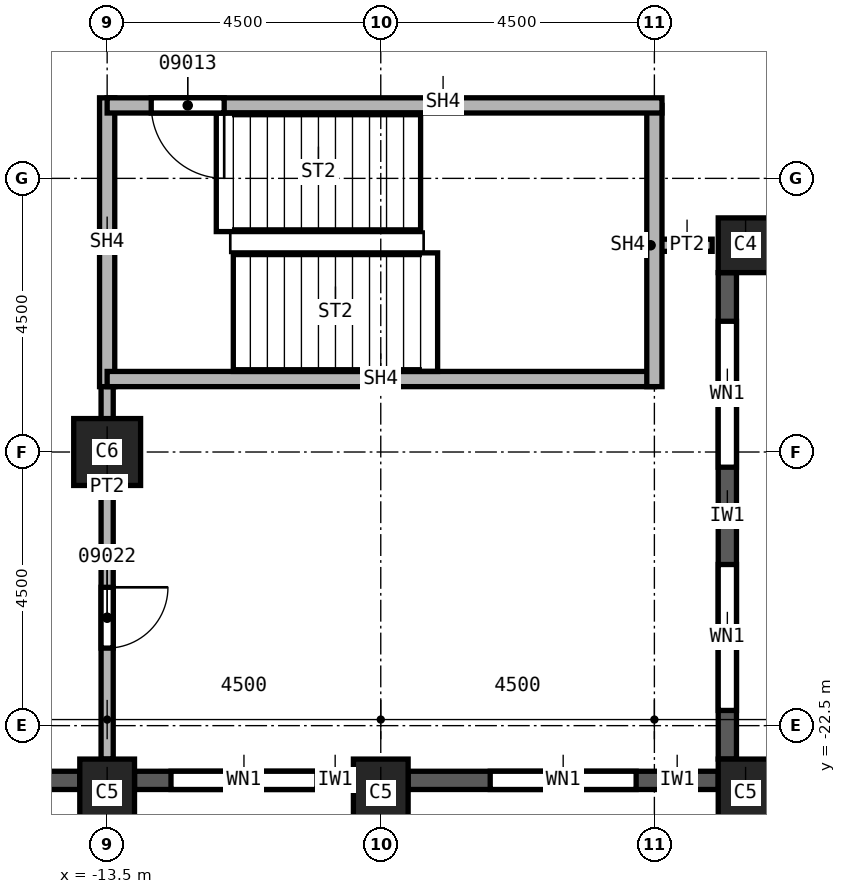
"""IFC4 building model, lengths in metres.
Left out: names, types, materials, properties, quantities, classifications, styles, units other than length and angle.
Written with IfcOpenShell. Run it as: python <this file> out.ifc"""

import sys

from ifc_helpers import new_model, si_unit, direction, frame, frame_2d, origin, origin_2d, place, context, subcontext, project, spatial, rectangle, extrude, element, fill, save


model = new_model("IFC4")
c1 = context("Model", 3, precision=1e-05, world=origin(), true_north=direction((0.0, 1.0)))
c2 = subcontext(c1, "Body", "Model", "MODEL_VIEW")
j1 = project(units=[si_unit("LENGTHUNIT", "METRE"), si_unit("PLANEANGLEUNIT", "RADIAN")], contexts=[c1])
p1 = place(None, origin())
s1 = spatial("IfcSite", under=j1, at=p1, CompositionType="ELEMENT")
p2 = place(p1, origin())
s2 = spatial("IfcBuilding", under=s1, at=p2, CompositionType="ELEMENT")
p3 = place(p2, frame((0.0, 0.0, 162.0)))
s3 = spatial("IfcBuildingStorey", under=s2, at=p3, CompositionType="ELEMENT", Elevation=162.0)
p4 = place(p3, frame((-13.5, -18.0, 0.0), z_axis=(0.0, 0.0, 1.0), x_axis=(1.0, 0.0, 0.0)))
e1 = element("IfcColumn", 1, at=p4, inside=s3, PredefinedType="COLUMN", context=c2, shape_type="SweptSolid", body=[
    extrude(rectangle(XDim=1.1, YDim=1.1, at=origin_2d()), origin(), (0.0, 0.0, 1.0), 3.7),
])
for number, where, z_axis, x_axis in (
    (2, (-3.0, -23.6, 0.0), (0.0, 0.0, 1.0), (1.0, 0.0, 0.0)),
    (3, (-9.0, -23.6, 0.0), (0.0, 0.0, 1.0), (1.0, 0.0, 0.0)),
    (4, (-13.5, -23.6, 0.0), (0.0, 0.0, 1.0), (1.0, 0.0, 0.0)),
):
    element("IfcColumn", number, at=place(p3, frame(where, z_axis=z_axis, x_axis=x_axis)), inside=s3, PredefinedType="COLUMN", context=c2, shape_type="SweptSolid", body=[
        extrude(rectangle(XDim=0.9, YDim=1.1, at=origin_2d()), origin(), (0.0, 0.0, 1.0), 3.7),
    ])
p5 = place(p3, frame((-3.0, -14.6, 0.0), z_axis=(0.0, 0.0, 1.0), x_axis=(1.0, 0.0, 0.0)))
e5 = element("IfcColumn", 5, at=p5, inside=s3, PredefinedType="COLUMN", context=c2, shape_type="SweptSolid", body=[
    extrude(rectangle(XDim=0.9, YDim=0.9, at=origin_2d()), origin(), (0.0, 0.0, 1.0), 3.7),
])
p6 = place(p3, frame((-17.55, -23.4, 0.0), z_axis=(0.0, 0.0, 1.0), x_axis=(1.0, 0.0, 0.0)))
e6 = element("IfcWall", 6, at=p6, inside=s3, PredefinedType="SOLIDWALL", context=c2, shape_type="SweptSolid", body=[
    extrude(rectangle(XDim=3.6, YDim=0.3, at=frame_2d((1.8, 0.0))), origin(), (0.0, 0.0, 1.0), 3.1),
])
p7 = place(p6, frame((0.775, 0.0, 0.8)))
e7 = element("IfcOpeningElement", 7, at=p7, cuts=e6, PredefinedType="OPENING", context=c2, shape_type="SweptSolid", body=[
    extrude(rectangle(XDim=1.0, YDim=1.95, at=frame_2d((0.5, 0.975))), frame((0.0, 0.15, 0.0), z_axis=(0.0, -1.0, 0.0), x_axis=(1.0, 0.0, 0.0)), (0.0, 0.0, 1.0), 0.3),
])
p8 = place(p6, frame((2.375, 0.0, 0.8)))
e8 = element("IfcOpeningElement", 8, at=p8, cuts=e6, PredefinedType="OPENING", context=c2, shape_type="SweptSolid", body=[
    extrude(rectangle(XDim=0.6, YDim=1.95, at=frame_2d((0.3, 0.975))), frame((0.0, 0.15, 0.0), z_axis=(0.0, -1.0, 0.0), x_axis=(1.0, 0.0, 0.0)), (0.0, 0.0, 1.0), 0.3),
])
p9 = place(p3, frame((-13.05, -23.4, 0.0), z_axis=(0.0, 0.0, 1.0), x_axis=(1.0, 0.0, 0.0)))
e9 = element("IfcWall", 9, at=p9, inside=s3, PredefinedType="SOLIDWALL", context=c2, shape_type="SweptSolid", body=[
    extrude(rectangle(XDim=3.6, YDim=0.3, at=frame_2d((1.8, 0.0))), origin(), (0.0, 0.0, 1.0), 3.1),
])
p10 = place(p9, frame((0.6, 0.0, 0.8)))
e10 = element("IfcOpeningElement", 10, at=p10, cuts=e9, PredefinedType="OPENING", context=c2, shape_type="SweptSolid", body=[
    extrude(rectangle(XDim=2.4, YDim=1.95, at=frame_2d((1.2, 0.975))), frame((0.0, 0.15, 0.0), z_axis=(0.0, -1.0, 0.0), x_axis=(1.0, 0.0, 0.0)), (0.0, 0.0, 1.0), 0.3),
])
p11 = place(p3, frame((-8.55, -23.4, 0.0), z_axis=(0.0, 0.0, 1.0), x_axis=(1.0, 0.0, 0.0)))
e11 = element("IfcWall", 11, at=p11, inside=s3, PredefinedType="SOLIDWALL", context=c2, shape_type="SweptSolid", body=[
    extrude(rectangle(XDim=5.1, YDim=0.3, at=frame_2d((2.55, 0.0))), origin(), (0.0, 0.0, 1.0), 3.1),
])
p12 = place(p11, frame((1.35, 0.0, 0.8)))
e12 = element("IfcOpeningElement", 12, at=p12, cuts=e11, PredefinedType="OPENING", context=c2, shape_type="SweptSolid", body=[
    extrude(rectangle(XDim=2.4, YDim=1.95, at=frame_2d((1.2, 0.975))), frame((0.0, 0.15, 0.0), z_axis=(0.0, -1.0, 0.0), x_axis=(1.0, 0.0, 0.0)), (0.0, 0.0, 1.0), 0.3),
])
p13 = place(p3, frame((-3.3, -23.05, 0.0), z_axis=(0.0, 0.0, 1.0), x_axis=(0.0, 1.0, 0.0)))
e13 = element("IfcWall", 13, at=p13, inside=s3, PredefinedType="SOLIDWALL", context=c2, shape_type="SweptSolid", body=[
    extrude(rectangle(XDim=8.0, YDim=0.3, at=frame_2d((4.0, 0.0))), origin(), (0.0, 0.0, 1.0), 3.1),
])
p14 = place(p13, frame((0.8, 0.0, 0.8)))
e14 = element("IfcOpeningElement", 14, at=p14, cuts=e13, PredefinedType="OPENING", context=c2, shape_type="SweptSolid", body=[
    extrude(rectangle(XDim=2.4, YDim=1.95, at=frame_2d((1.2, 0.975))), frame((0.0, 0.15, 0.0), z_axis=(0.0, -1.0, 0.0), x_axis=(1.0, 0.0, 0.0)), (0.0, 0.0, 1.0), 0.3),
])
p15 = place(p13, frame((4.8, 0.0, 0.8)))
e15 = element("IfcOpeningElement", 15, at=p15, cuts=e13, PredefinedType="OPENING", context=c2, shape_type="SweptSolid", body=[
    extrude(rectangle(XDim=2.4, YDim=1.95, at=frame_2d((1.2, 0.975))), frame((0.0, 0.15, 0.0), z_axis=(0.0, -1.0, 0.0), x_axis=(1.0, 0.0, 0.0)), (0.0, 0.0, 1.0), 0.3),
])
p16 = place(p3, frame((-13.5, -16.675, 0.0), z_axis=(0.0, 0.0, 1.0), x_axis=(0.0, -1.0, 0.0)))
e16 = element("IfcWall", 16, at=p16, inside=s3, PredefinedType="PARTITIONING", context=c2, shape_type="SweptSolid", body=[
    extrude(rectangle(XDim=6.375, YDim=0.2, at=frame_2d((3.188, 0.0))), origin(), (0.0, 0.0, 1.0), 3.7),
])
p17 = place(p16, frame((3.55, 0.0, 0.0)))
e17 = element("IfcOpeningElement", 17, at=p17, cuts=e16, PredefinedType="OPENING", context=c2, shape_type="SweptSolid", body=[
    extrude(rectangle(XDim=1.0, YDim=2.1, at=frame_2d((0.5, 1.05))), frame((0.0, 0.1, 0.0), z_axis=(0.0, -1.0, 0.0), x_axis=(1.0, 0.0, 0.0)), (0.0, 0.0, 1.0), 0.2),
])
p18 = place(p3, frame((-3.55, -14.6, 0.0), z_axis=(0.0, 0.0, 1.0), x_axis=(-1.0, 0.0, 0.0)))
e18 = element("IfcWall", 18, at=p18, inside=s3, PredefinedType="PARTITIONING", context=c2, shape_type="SweptSolid", body=[
    extrude(rectangle(XDim=0.95, YDim=0.2, at=frame_2d((0.475, 0.0))), origin(), (0.0, 0.0, 1.0), 3.7),
])
p19 = place(p3, frame((-13.5, -12.175, 0.0), z_axis=(0.0, 0.0, 1.0), x_axis=(0.0, -1.0, 0.0)))
e19 = element("IfcWall", 19, at=p19, inside=s3, PredefinedType="SOLIDWALL", context=c2, shape_type="SweptSolid", body=[
    extrude(rectangle(XDim=4.75, YDim=0.25, at=frame_2d((2.375, 0.0))), origin(), (0.0, 0.0, 1.0), 3.7),
])
p20 = place(p3, frame((-4.5, -16.8, 0.0), z_axis=(0.0, 0.0, 1.0), x_axis=(-1.0, 0.0, 0.0)))
e20 = element("IfcWall", 20, at=p20, inside=s3, PredefinedType="SOLIDWALL", context=c2, shape_type="SweptSolid", body=[
    extrude(rectangle(XDim=9.0, YDim=0.25, at=frame_2d((4.5, 0.0))), origin(), (0.0, 0.0, 1.0), 3.7),
])
p21 = place(p3, frame((-4.5, -12.3, 0.0), z_axis=(0.0, 0.0, 1.0), x_axis=(0.0, -1.0, 0.0)))
e21 = element("IfcWall", 21, at=p21, inside=s3, PredefinedType="SOLIDWALL", context=c2, shape_type="SweptSolid", body=[
    extrude(rectangle(XDim=4.625, YDim=0.25, at=frame_2d((2.312, 0.0))), origin(), (0.0, 0.0, 1.0), 3.7),
])
p22 = place(p3, frame((-4.375, -12.3, 0.0), z_axis=(0.0, 0.0, 1.0), x_axis=(-1.0, 0.0, 0.0)))
e22 = element("IfcWall", 22, at=p22, inside=s3, PredefinedType="SOLIDWALL", context=c2, shape_type="SweptSolid", body=[
    extrude(rectangle(XDim=9.125, YDim=0.25, at=frame_2d((4.562, 0.0))), origin(), (0.0, 0.0, 1.0), 3.7),
])
p23 = place(p22, frame((7.2, 0.0, 0.0)))
e23 = element("IfcOpeningElement", 23, at=p23, cuts=e22, PredefinedType="OPENING", context=c2, shape_type="SweptSolid", body=[
    extrude(rectangle(XDim=1.2, YDim=2.1, at=frame_2d((0.6, 1.05))), frame((0.0, 0.125, 0.0), z_axis=(0.0, -1.0, 0.0), x_axis=(1.0, 0.0, 0.0)), (0.0, 0.0, 1.0), 0.25),
])
p24 = place(p10, origin())
e24 = element("IfcWindow", 24, at=p24, inside=s3, PartitioningType="SINGLE_PANEL", PredefinedType="WINDOW", context=c2, shape_type="SweptSolid", body=[
    extrude(rectangle(XDim=2.4, YDim=1.95, at=frame_2d((1.2, 0.975))), frame((0.0, 0.03, 0.0), z_axis=(0.0, -1.0, 0.0), x_axis=(1.0, 0.0, 0.0)), (0.0, 0.0, 1.0), 0.06),
])
fill(e10, e24)
p25 = place(p12, origin())
e25 = element("IfcWindow", 25, at=p25, inside=s3, PartitioningType="SINGLE_PANEL", PredefinedType="WINDOW", context=c2, shape_type="SweptSolid", body=[
    extrude(rectangle(XDim=2.4, YDim=1.95, at=frame_2d((1.2, 0.975))), frame((0.0, 0.03, 0.0), z_axis=(0.0, -1.0, 0.0), x_axis=(1.0, 0.0, 0.0)), (0.0, 0.0, 1.0), 0.06),
])
fill(e12, e25)
p26 = place(p14, origin())
e26 = element("IfcWindow", 26, at=p26, inside=s3, PartitioningType="SINGLE_PANEL", PredefinedType="WINDOW", context=c2, shape_type="SweptSolid", body=[
    extrude(rectangle(XDim=2.4, YDim=1.95, at=frame_2d((1.2, 0.975))), frame((0.0, 0.03, 0.0), z_axis=(0.0, -1.0, 0.0), x_axis=(1.0, 0.0, 0.0)), (0.0, 0.0, 1.0), 0.06),
])
fill(e14, e26)
p27 = place(p15, origin())
e27 = element("IfcWindow", 27, at=p27, inside=s3, PartitioningType="SINGLE_PANEL", PredefinedType="WINDOW", context=c2, shape_type="SweptSolid", body=[
    extrude(rectangle(XDim=2.4, YDim=1.95, at=frame_2d((1.2, 0.975))), frame((0.0, 0.03, 0.0), z_axis=(0.0, -1.0, 0.0), x_axis=(1.0, 0.0, 0.0)), (0.0, 0.0, 1.0), 0.06),
])
fill(e15, e27)
p28 = place(p23, origin())
e28 = element("IfcDoor", 28, at=p28, inside=s3, OperationType="SINGLE_SWING_RIGHT", PredefinedType="DOOR", context=c2, shape_type="SweptSolid", body=[
    extrude(rectangle(XDim=1.2, YDim=2.1, at=frame_2d((0.6, 1.05))), frame((0.0, 0.025, 0.0), z_axis=(0.0, -1.0, 0.0), x_axis=(1.0, 0.0, 0.0)), (0.0, 0.0, 1.0), 0.05),
])
fill(e23, e28)
p29 = place(p17, origin())
e29 = element("IfcDoor", 29, at=p29, inside=s3, OperationType="SINGLE_SWING_LEFT", PredefinedType="DOOR", context=c2, shape_type="SweptSolid", body=[
    extrude(rectangle(XDim=1.0, YDim=2.1, at=frame_2d((0.5, 1.05))), frame((0.0, 0.025, 0.0), z_axis=(0.0, -1.0, 0.0), x_axis=(1.0, 0.0, 0.0)), (0.0, 0.0, 1.0), 0.05),
])
fill(e17, e29)
save(model, sys.argv[1])
